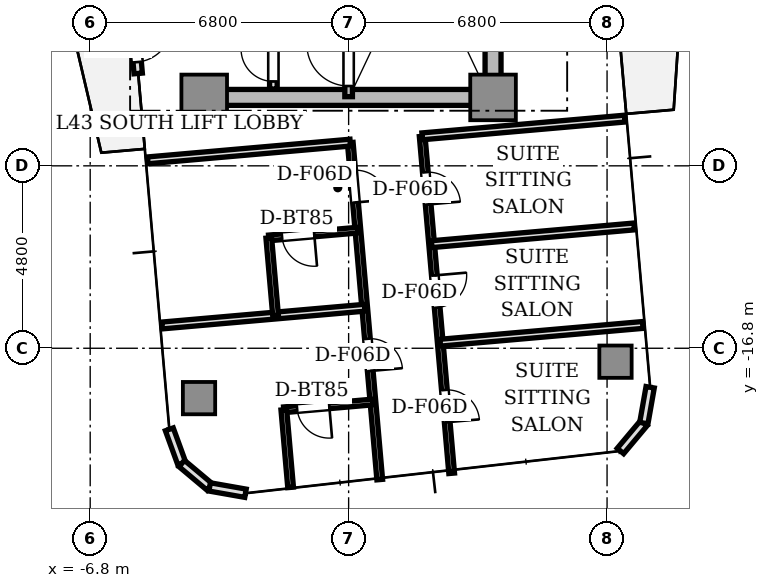
"""IFC4 building model, lengths in metres.
Left out: names, types, materials, properties, quantities, classifications, styles, units other than length and angle.
Written with IfcOpenShell. Run it as: python <this file> out.ifc"""

import sys

from ifc_helpers import new_model, si_unit, direction, frame, frame_2d, origin, origin_2d, place, context, subcontext, project, spatial, rectangle, extrude, source, transform, mapped, element, fill, save


model = new_model("IFC4")
c1 = context("Model", 3, precision=1e-05, world=origin(), true_north=direction((0.0, 1.0)))
c2 = subcontext(c1, "Body", "Model", "MODEL_VIEW")
j1 = project(units=[si_unit("LENGTHUNIT", "METRE"), si_unit("PLANEANGLEUNIT", "RADIAN")], contexts=[c1])
p1 = place(None, origin())
s1 = spatial("IfcSite", under=j1, at=p1, CompositionType="ELEMENT")
p2 = place(p1, origin())
s2 = spatial("IfcBuilding", under=s1, at=p2, CompositionType="ELEMENT")
p3 = place(p2, frame((0.0, 0.0, 157.3)))
s3 = spatial("IfcBuildingStorey", under=s2, at=p3, CompositionType="ELEMENT", Elevation=157.3)
p4 = place(p3, frame((-3.55, -10.2, 0.0), z_axis=(0.0, 0.0, 1.0), x_axis=(1.0, 0.0, 0.0)))
e1 = element("IfcWall", 1, at=p4, inside=s3, PredefinedType="SHEAR", context=c2, shape_type="SweptSolid", body=[
    extrude(rectangle(XDim=7.1, YDim=0.42, at=frame_2d((3.55, 0.0))), origin(), (0.0, 0.0, 1.0), 3.11),
])
p5 = place(p3, frame((3.8, -9.75, 0.0), z_axis=(0.0, 0.0, 1.0), x_axis=(0.0, 1.0, 0.0)))
e2 = element("IfcWall", 2, at=p5, inside=s3, PredefinedType="SHEAR", context=c2, shape_type="SweptSolid", body=[
    extrude(rectangle(XDim=6.9, YDim=0.42, at=frame_2d((3.45, 0.0))), origin(), (0.0, 0.0, 1.0), 3.11),
])
m1 = source(origin(), c2, "Body", "SweptSolid", [
    extrude(rectangle(XDim=1.2, YDim=1.2, at=origin_2d()), origin(), (0.0, 0.0, 1.0), 3.11),
])
for number, where, z_axis, x_axis in (
    (3, (-3.8, -10.2, 0.0), (0.0, 0.0, 1.0), (1.0, 0.0, 0.0)),
    (4, (3.8, -10.2, 0.0), (0.0, 0.0, 1.0), (1.0, 0.0, 0.0)),
):
    element("IfcColumn", number, at=place(p3, frame(where, z_axis=z_axis, x_axis=x_axis)), inside=s3, PredefinedType="COLUMN", context=c2, shape_type="MappedRepresentation", body=[
        mapped(m1, transform((0.0, 0.0, 0.0), scale=1.0)),
    ])
m2 = source(origin(), c2, "Body", "SweptSolid", [
    extrude(rectangle(XDim=0.85, YDim=0.85, at=origin_2d()), origin(), (0.0, 0.0, 1.0), 3.11),
])
for number, where, z_axis, x_axis in (
    (5, (-3.936, -18.112, 0.0), (0.0, 0.0, 1.0), (1.0, 0.0, 0.0)),
    (6, (7.022, -17.153, 0.0), (0.0, 0.0, 1.0), (1.0, 0.0, 0.0)),
):
    element("IfcColumn", number, at=place(p3, frame(where, z_axis=z_axis, x_axis=x_axis)), inside=s3, PredefinedType="COLUMN", context=c2, shape_type="MappedRepresentation", body=[
        mapped(m2, transform((0.0, 0.0, 0.0), scale=1.0)),
    ])
p6 = place(p3, frame((-5.772, -6.879, 0.0), z_axis=(0.0, 0.0, 1.0), x_axis=(0.087168071984, -0.996193619346, 0.0)))
e7 = element("IfcWall", 7, at=p6, inside=s3, PredefinedType="STANDARD", context=c2, shape_type="SweptSolid", body=[
    extrude(rectangle(XDim=2.7, YDim=0.22, at=frame_2d((1.35, 0.0))), origin(), (0.0, 0.0, 1.0), 3.11),
])
p7 = place(p6, frame((1.4, 0.0, 0.0)))
e8 = element("IfcOpeningElement", 8, at=p7, cuts=e7, PredefinedType="OPENING", context=c2, shape_type="SweptSolid", body=[
    extrude(rectangle(XDim=1.0, YDim=2.2, at=frame_2d((0.5, 1.1))), frame((0.0, 0.12, 0.0), z_axis=(0.0, -1.0, 0.0), x_axis=(1.0, 0.0, 0.0)), (0.0, 0.0, 1.0), 0.24),
])
p8 = place(p3, frame((-4.718, -18.933, 0.0), z_axis=(0.0, 0.0, 1.0), x_axis=(0.34188635151, -0.939741306239, 0.0)))
e9 = element("IfcWall", 9, at=p8, inside=s3, PredefinedType="STANDARD", context=c2, shape_type="SweptSolid", body=[
    extrude(rectangle(XDim=0.958, YDim=0.22, at=frame_2d((0.479, 0.0))), origin(), (0.0, 0.0, 1.0), 3.11),
])
for number, where, z_axis, x_axis in (
    (10, (-4.39, -19.833, 0.0), (0.0, 0.0, 1.0), (0.766, -0.643, 0.0)),
    (11, (-3.657, -20.449, 0.0), (0.0, 0.0, 1.0), (0.985, -0.174, 0.0)),
):
    element("IfcWall", number, at=place(p3, frame(where, z_axis=z_axis, x_axis=x_axis)), inside=s3, PredefinedType="STANDARD", context=c2, shape_type="SweptSolid", body=[
        extrude(rectangle(XDim=0.958, YDim=0.22, at=frame_2d((0.479, 0.0))), origin(), (0.0, 0.0, 1.0), 3.11),
    ])
for number, where, z_axis, x_axis in (
    (12, (7.152, -19.503, 0.0), (0.0, 0.0, 1.0), (0.643, 0.766, 0.0)),
    (13, (7.768, -18.769, 0.0), (0.0, 0.0, 1.0), (0.174, 0.985, 0.0)),
):
    element("IfcWall", number, at=place(p3, frame(where, z_axis=z_axis, x_axis=x_axis)), inside=s3, PredefinedType="STANDARD", context=c2, shape_type="SweptSolid", body=[
        extrude(rectangle(XDim=0.958, YDim=0.22, at=frame_2d((0.479, 0.0))), origin(), (0.0, 0.0, 1.0), 3.11),
    ])
p9 = place(p3, frame((0.0, -10.18, 0.0), z_axis=(0.0, 0.0, 1.0), x_axis=(0.0, 1.0, 0.0)))
e14 = element("IfcWall", 14, at=p9, inside=s3, PredefinedType="SOLIDWALL", context=c2, shape_type="SweptSolid", body=[
    extrude(rectangle(XDim=7.68, YDim=0.2, at=frame_2d((3.84, 0.0))), origin(), (0.0, 0.0, 1.0), 3.11),
])
p10 = place(p9, frame((0.28, 0.0, 0.0)))
e15 = element("IfcOpeningElement", 15, at=p10, cuts=e14, PredefinedType="OPENING", context=c2, shape_type="SweptSolid", body=[
    extrude(rectangle(XDim=1.1, YDim=2.15, at=frame_2d((0.55, 1.075))), frame((0.0, 0.11, 0.0), z_axis=(0.0, -1.0, 0.0), x_axis=(1.0, 0.0, 0.0)), (0.0, 0.0, 1.0), 0.22),
])
p11 = place(p3, frame((-1.98, -9.98, 0.0), z_axis=(0.0, 0.0, 1.0), x_axis=(0.0, 1.0, 0.0)))
e16 = element("IfcWall", 16, at=p11, inside=s3, PredefinedType="SOLIDWALL", context=c2, shape_type="SweptSolid", body=[
    extrude(rectangle(XDim=4.66, YDim=0.2, at=frame_2d((2.33, 0.0))), origin(), (0.0, 0.0, 1.0), 2.66),
])
p12 = place(p11, frame((0.2, 0.0, 0.0)))
e17 = element("IfcOpeningElement", 17, at=p12, cuts=e16, PredefinedType="OPENING", context=c2, shape_type="SweptSolid", body=[
    extrude(rectangle(XDim=0.85, YDim=2.1, at=frame_2d((0.425, 1.05))), frame((0.0, 0.11, 0.0), z_axis=(0.0, -1.0, 0.0), x_axis=(1.0, 0.0, 0.0)), (0.0, 0.0, 1.0), 0.22),
])
p13 = place(p3, frame((1.936, -11.224, 0.0), z_axis=(0.0, 0.0, 1.0), x_axis=(0.087151636982, -0.996195057291, 0.0)))
e18 = element("IfcWall", 18, at=p13, inside=s3, PredefinedType="PARTITIONING", context=c2, shape_type="SweptSolid", body=[
    extrude(rectangle(XDim=8.9, YDim=0.15, at=frame_2d((4.45, 0.0))), origin(), (0.0, 0.0, 1.0), 2.66),
])
p14 = place(p13, frame((0.949, 0.0, 0.0)))
e19 = element("IfcOpeningElement", 19, at=p14, cuts=e18, PredefinedType="OPENING", context=c2, shape_type="SweptSolid", body=[
    extrude(rectangle(XDim=0.85, YDim=2.1, at=frame_2d((0.425, 1.05))), frame((0.0, 0.085, 0.0), z_axis=(0.0, -1.0, 0.0), x_axis=(1.0, 0.0, 0.0)), (0.0, 0.0, 1.0), 0.17),
])
p15 = place(p13, frame((3.674, 0.0, 0.0)))
e20 = element("IfcOpeningElement", 20, at=p15, cuts=e18, PredefinedType="OPENING", context=c2, shape_type="SweptSolid", body=[
    extrude(rectangle(XDim=0.85, YDim=2.1, at=frame_2d((0.425, 1.05))), frame((0.0, 0.085, 0.0), z_axis=(0.0, -1.0, 0.0), x_axis=(1.0, 0.0, 0.0)), (0.0, 0.0, 1.0), 0.17),
])
p16 = place(p13, frame((6.7, 0.0, 0.0)))
e21 = element("IfcOpeningElement", 21, at=p16, cuts=e18, PredefinedType="OPENING", context=c2, shape_type="SweptSolid", body=[
    extrude(rectangle(XDim=0.85, YDim=2.1, at=frame_2d((0.425, 1.05))), frame((0.0, 0.085, 0.0), z_axis=(0.0, -1.0, 0.0), x_axis=(1.0, 0.0, 0.0)), (0.0, 0.0, 1.0), 0.17),
])
p17 = place(p3, frame((0.043, -11.39, 0.0), z_axis=(0.0, 0.0, 1.0), x_axis=(0.087178860582, -0.996192675273, 0.0)))
e22 = element("IfcWall", 22, at=p17, inside=s3, PredefinedType="PARTITIONING", context=c2, shape_type="SweptSolid", body=[
    extrude(rectangle(XDim=8.9, YDim=0.15, at=frame_2d((4.45, 0.0))), origin(), (0.0, 0.0, 1.0), 2.66),
])
p18 = place(p17, frame((0.73, 0.0, 0.0)))
e23 = element("IfcOpeningElement", 23, at=p18, cuts=e22, PredefinedType="OPENING", context=c2, shape_type="SweptSolid", body=[
    extrude(rectangle(XDim=0.85, YDim=2.1, at=frame_2d((0.425, 1.05))), frame((0.0, 0.085, 0.0), z_axis=(0.0, -1.0, 0.0), x_axis=(1.0, 0.0, 0.0)), (0.0, 0.0, 1.0), 0.17),
])
p19 = place(p17, frame((5.181, 0.0, 0.0)))
e24 = element("IfcOpeningElement", 24, at=p19, cuts=e22, PredefinedType="OPENING", context=c2, shape_type="SweptSolid", body=[
    extrude(rectangle(XDim=0.85, YDim=2.1, at=frame_2d((0.425, 1.05))), frame((0.0, 0.085, 0.0), z_axis=(0.0, -1.0, 0.0), x_axis=(1.0, 0.0, 0.0)), (0.0, 0.0, 1.0), 0.17),
])
for number, where, z_axis, x_axis in (
    (25, (1.936, -11.224, 0.0), (0.0, 0.0, 1.0), (0.996, 0.087, 0.0)),
    (26, (-5.287, -11.856, 0.0), (0.0, 0.0, 1.0), (0.996, 0.087, 0.0)),
    (27, (2.184, -14.061, 0.0), (0.0, 0.0, 1.0), (0.996, 0.087, 0.0)),
    (28, (2.411, -16.653, 0.0), (0.0, 0.0, 1.0), (0.996, 0.087, 0.0)),
    (29, (0.423, -15.734, 0.0), (0.0, 0.0, 1.0), (-0.996, -0.087, 0.0)),
):
    element("IfcWall", number, at=place(p3, frame(where, z_axis=z_axis, x_axis=x_axis)), inside=s3, PredefinedType="PARTITIONING", context=c2, shape_type="SweptSolid", body=[
        extrude(rectangle(XDim=5.35, YDim=0.18, at=frame_2d((2.675, 0.0))), origin(), (0.0, 0.0, 1.0), 2.66),
    ])
p20 = place(p3, frame((0.244, -13.692, 0.0), z_axis=(0.0, 0.0, 1.0), x_axis=(-0.996197656711, -0.087121918963, 0.0)))
e30 = element("IfcWall", 30, at=p20, inside=s3, PredefinedType="PARTITIONING", context=c2, shape_type="SweptSolid", body=[
    extrude(rectangle(XDim=2.354, YDim=0.15, at=frame_2d((1.177, 0.0))), origin(), (0.0, 0.0, 1.0), 2.66),
])
p21 = place(p20, frame((1.154, 0.0, 0.0)))
e31 = element("IfcOpeningElement", 31, at=p21, cuts=e30, PredefinedType="OPENING", context=c2, shape_type="SweptSolid", body=[
    extrude(rectangle(XDim=0.85, YDim=2.1, at=frame_2d((0.425, 1.05))), frame((0.0, 0.085, 0.0), z_axis=(0.0, -1.0, 0.0), x_axis=(1.0, 0.0, 0.0)), (0.0, 0.0, 1.0), 0.17),
])
p22 = place(p3, frame((-2.101, -13.897, 0.0), z_axis=(0.0, 0.0, 1.0), x_axis=(0.087174336889, -0.99619307114, 0.0)))
e32 = element("IfcWall", 32, at=p22, inside=s3, PredefinedType="PARTITIONING", context=c2, shape_type="SweptSolid", body=[
    extrude(rectangle(XDim=2.05, YDim=0.15, at=frame_2d((1.025, 0.0))), origin(), (0.0, 0.0, 1.0), 2.66),
])
p23 = place(p3, frame((0.64, -18.213, 0.0), z_axis=(0.0, 0.0, 1.0), x_axis=(-0.996188649846, -0.087224846905, 0.0)))
e33 = element("IfcWall", 33, at=p23, inside=s3, PredefinedType="PARTITIONING", context=c2, shape_type="SweptSolid", body=[
    extrude(rectangle(XDim=2.354, YDim=0.15, at=frame_2d((1.177, 0.0))), origin(), (0.0, 0.0, 1.0), 2.66),
])
p24 = place(p23, frame((1.154, 0.0, 0.0)))
e34 = element("IfcOpeningElement", 34, at=p24, cuts=e33, PredefinedType="OPENING", context=c2, shape_type="SweptSolid", body=[
    extrude(rectangle(XDim=0.85, YDim=2.1, at=frame_2d((0.425, 1.05))), frame((0.0, 0.085, 0.0), z_axis=(0.0, -1.0, 0.0), x_axis=(1.0, 0.0, 0.0)), (0.0, 0.0, 1.0), 0.17),
])
p25 = place(p3, frame((-1.705, -18.419, 0.0), z_axis=(0.0, 0.0, 1.0), x_axis=(0.087056149438, -0.996203406361, 0.0)))
e35 = element("IfcWall", 35, at=p25, inside=s3, PredefinedType="PARTITIONING", context=c2, shape_type="SweptSolid", body=[
    extrude(rectangle(XDim=2.05, YDim=0.15, at=frame_2d((1.025, 0.0))), origin(), (0.0, 0.0, 1.0), 2.66),
])
m3 = source(origin(), c2, "Body", "SweptSolid", [
    extrude(rectangle(XDim=1.0, YDim=0.05, at=origin_2d()), origin(), (0.0, 0.0, 1.0), 2.2),
])
p26 = place(p7, frame((0.5, 0.0, 0.0)))
e36 = element("IfcDoor", 36, at=p26, inside=s3, OperationType="SINGLE_SWING_LEFT", PredefinedType="DOOR", context=c2, shape_type="MappedRepresentation", body=[
    mapped(m3, transform((0.0, 0.0, 0.0), scale=1.0)),
])
fill(e8, e36)
m4 = source(origin(), c2, "Body", "SweptSolid", [
    extrude(rectangle(XDim=1.1, YDim=0.05, at=origin_2d()), origin(), (0.0, 0.0, 1.0), 2.15),
])
p27 = place(p10, frame((0.55, 0.0, 0.0)))
e37 = element("IfcDoor", 37, at=p27, inside=s3, OperationType="SINGLE_SWING_RIGHT", PredefinedType="DOOR", context=c2, shape_type="MappedRepresentation", body=[
    mapped(m4, transform((0.0, 0.0, 0.0), scale=1.0)),
])
fill(e15, e37)
m5 = source(origin(), c2, "Body", "SweptSolid", [
    extrude(rectangle(XDim=0.85, YDim=0.05, at=origin_2d()), origin(), (0.0, 0.0, 1.0), 2.1),
])
p28 = place(p12, frame((0.425, 0.0, 0.0)))
e38 = element("IfcDoor", 38, at=p28, inside=s3, OperationType="SINGLE_SWING_RIGHT", PredefinedType="DOOR", context=c2, shape_type="MappedRepresentation", body=[
    mapped(m5, transform((0.0, 0.0, 0.0), scale=1.0)),
])
fill(e17, e38)
p29 = place(p14, frame((0.425, 0.0, 0.0)))
e39 = element("IfcDoor", 39, at=p29, inside=s3, OperationType="SINGLE_SWING_RIGHT", PredefinedType="DOOR", context=c2, shape_type="MappedRepresentation", body=[
    mapped(m5, transform((0.0, 0.0, 0.0), scale=1.0)),
])
fill(e19, e39)
p30 = place(p15, frame((0.425, 0.0, 0.0)))
e40 = element("IfcDoor", 40, at=p30, inside=s3, OperationType="SINGLE_SWING_LEFT", PredefinedType="DOOR", context=c2, shape_type="MappedRepresentation", body=[
    mapped(m5, transform((0.0, 0.0, 0.0), scale=1.0)),
])
fill(e20, e40)
p31 = place(p16, frame((0.425, 0.0, 0.0)))
e41 = element("IfcDoor", 41, at=p31, inside=s3, OperationType="SINGLE_SWING_RIGHT", PredefinedType="DOOR", context=c2, shape_type="MappedRepresentation", body=[
    mapped(m5, transform((0.0, 0.0, 0.0), scale=1.0)),
])
fill(e21, e41)
p32 = place(p21, frame((0.425, 0.0, 0.0)))
e42 = element("IfcDoor", 42, at=p32, inside=s3, OperationType="SINGLE_SWING_LEFT", PredefinedType="DOOR", context=c2, shape_type="MappedRepresentation", body=[
    mapped(m5, transform((0.0, 0.0, 0.0), scale=1.0)),
])
fill(e31, e42)
p33 = place(p18, frame((0.425, 0.0, 0.0)))
e43 = element("IfcDoor", 43, at=p33, inside=s3, OperationType="SINGLE_SWING_RIGHT", PredefinedType="DOOR", context=c2, shape_type="MappedRepresentation", body=[
    mapped(m5, transform((0.0, 0.0, 0.0), scale=1.0)),
])
fill(e23, e43)
p34 = place(p24, frame((0.425, 0.0, 0.0)))
e44 = element("IfcDoor", 44, at=p34, inside=s3, OperationType="SINGLE_SWING_LEFT", PredefinedType="DOOR", context=c2, shape_type="MappedRepresentation", body=[
    mapped(m5, transform((0.0, 0.0, 0.0), scale=1.0)),
])
fill(e34, e44)
p35 = place(p19, frame((0.425, 0.0, 0.0)))
e45 = element("IfcDoor", 45, at=p35, inside=s3, OperationType="SINGLE_SWING_RIGHT", PredefinedType="DOOR", context=c2, shape_type="MappedRepresentation", body=[
    mapped(m5, transform((0.0, 0.0, 0.0), scale=1.0)),
])
fill(e24, e45)
save(model, sys.argv[1])
